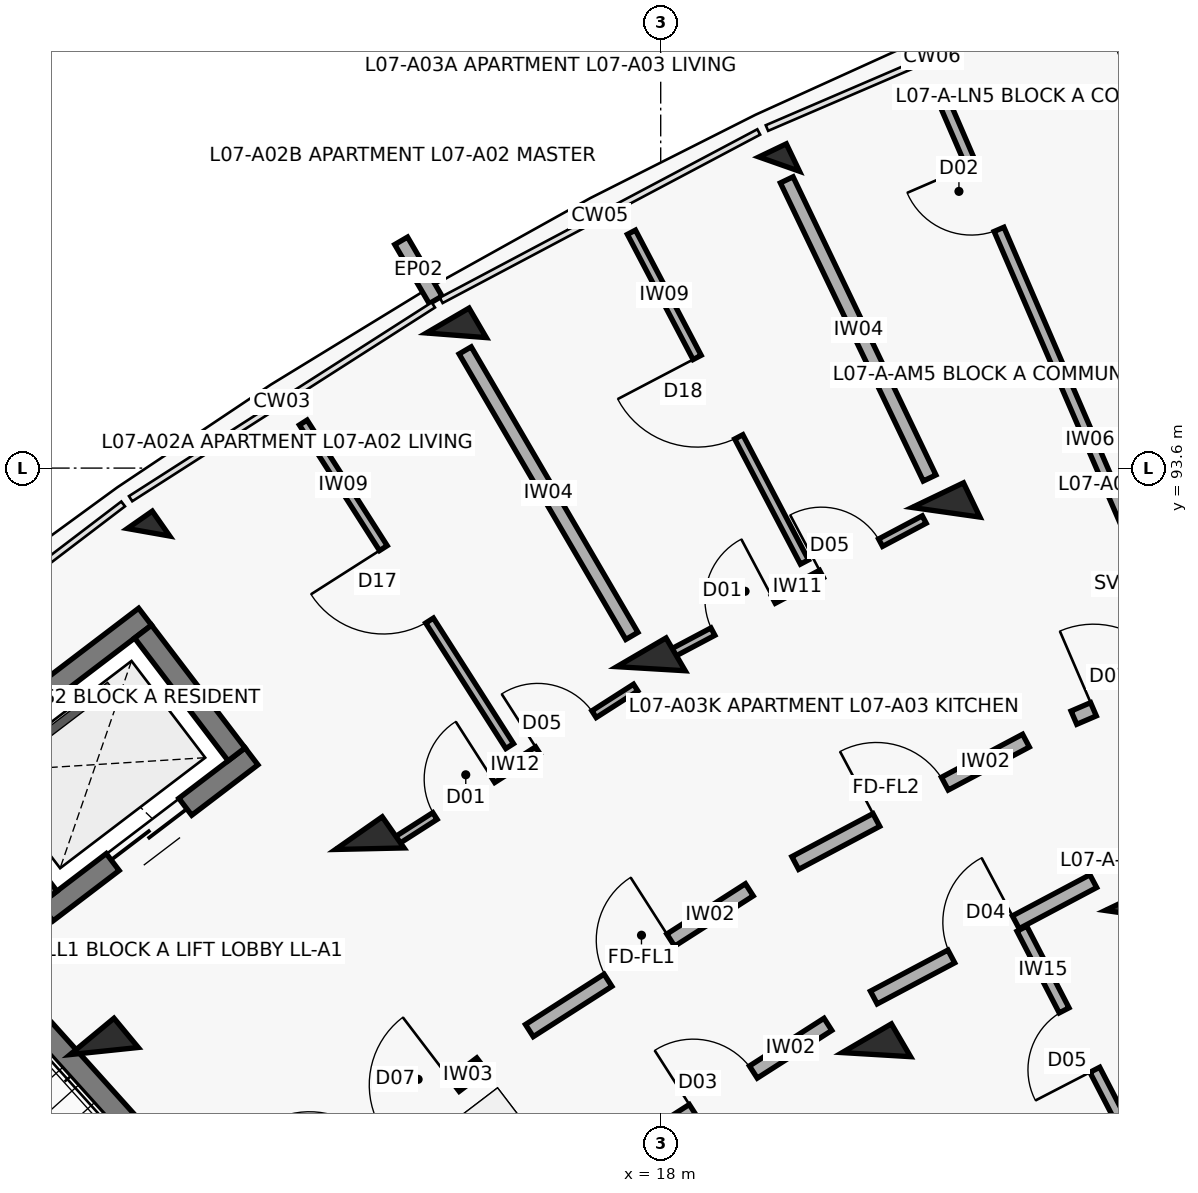
"""IFC4 building model, lengths in metres.
Left out: names, types, materials, properties, quantities, classifications, styles, units other than length and angle.
Written with IfcOpenShell. Run it as: python <this file> out.ifc"""

import sys

from ifc_helpers import new_model, si_unit, direction, frame, frame_2d, origin, origin_2d, place, context, subcontext, project, spatial, rectangle, extrude, element, fill, save


model = new_model("IFC4")
c1 = context("Model", 3, precision=1e-05, world=origin(), true_north=direction((0.0, 1.0)))
c2 = subcontext(c1, "Body", "Model", "MODEL_VIEW")
j1 = project(units=[si_unit("LENGTHUNIT", "METRE"), si_unit("PLANEANGLEUNIT", "RADIAN")], contexts=[c1])
p1 = place(None, origin())
s1 = spatial("IfcSite", under=j1, at=p1, CompositionType="ELEMENT")
p2 = place(p1, origin())
s2 = spatial("IfcBuilding", under=s1, at=p2, CompositionType="ELEMENT")
p3 = place(p2, frame((0.0, 0.0, 23.6)))
s3 = spatial("IfcBuildingStorey", under=s2, at=p3, CompositionType="ELEMENT", Elevation=23.6)
for number, where, z_axis, x_axis in (
    (1, (10.678, 85.93, 0.0), (0.0, 0.0, 1.0), (-0.638, 0.77, 0.0)),
    (2, (14.172, 88.592, 0.0), (0.0, 0.0, 1.0), (-0.573, 0.82, 0.0)),
):
    element("IfcColumn", number, at=place(p3, frame(where, z_axis=z_axis, x_axis=x_axis)), inside=s3, PredefinedType="COLUMN", context=c2, shape_type="SweptSolid", body=[
        extrude(rectangle(XDim=0.5, YDim=0.75, at=origin_2d()), origin(), (0.0, 0.0, 1.0), 3.1),
    ])
p4 = place(p3, frame((11.261, 92.755, 0.0), z_axis=(0.0, 0.0, 1.0), x_axis=(-0.573004420611, 0.819552276527, 0.0)))
e3 = element("IfcColumn", 3, at=p4, inside=s3, PredefinedType="COLUMN", context=c2, shape_type="SweptSolid", body=[
    extrude(rectangle(XDim=0.4, YDim=0.4, at=origin_2d()), origin(), (0.0, 0.0, 1.0), 3.1),
])
for number, where, z_axis, x_axis in (
    (4, (20.837, 85.882, 0.0), (0.0, 0.0, 1.0), (-0.504, 0.864, 0.0)),
    (5, (17.873, 90.96, 0.0), (0.0, 0.0, 1.0), (-0.504, 0.864, 0.0)),
):
    element("IfcColumn", number, at=place(p3, frame(where, z_axis=z_axis, x_axis=x_axis)), inside=s3, PredefinedType="COLUMN", context=c2, shape_type="SweptSolid", body=[
        extrude(rectangle(XDim=0.5, YDim=0.75, at=origin_2d()), origin(), (0.0, 0.0, 1.0), 3.1),
    ])
p5 = place(p3, frame((15.311, 95.347, 0.0), z_axis=(0.0, 0.0, 1.0), x_axis=(-0.504226211181, 0.863571611366, 0.0)))
e6 = element("IfcColumn", 6, at=p5, inside=s3, PredefinedType="COLUMN", context=c2, shape_type="SweptSolid", body=[
    extrude(rectangle(XDim=0.45, YDim=0.65, at=origin_2d()), origin(), (0.0, 0.0, 1.0), 3.1),
])
for number, where, z_axis, x_axis in (
    (7, (24.294, 87.716, 0.0), (0.0, 0.0, 1.0), (-0.432, 0.902, 0.0)),
    (8, (21.754, 93.019, 0.0), (0.0, 0.0, 1.0), (-0.432, 0.902, 0.0)),
):
    element("IfcColumn", number, at=place(p3, frame(where, z_axis=z_axis, x_axis=x_axis)), inside=s3, PredefinedType="COLUMN", context=c2, shape_type="SweptSolid", body=[
        extrude(rectangle(XDim=0.5, YDim=0.75, at=origin_2d()), origin(), (0.0, 0.0, 1.0), 3.1),
    ])
p6 = place(p3, frame((19.559, 97.6, 0.0), z_axis=(0.0, 0.0, 1.0), x_axis=(-0.432085748802, 0.901832526405, 0.0)))
e9 = element("IfcColumn", 9, at=p6, inside=s3, PredefinedType="COLUMN", context=c2, shape_type="SweptSolid", body=[
    extrude(rectangle(XDim=0.4, YDim=0.4, at=origin_2d()), origin(), (0.0, 0.0, 1.0), 3.1),
])
p7 = place(p3, frame((15.039, 95.813, 0.0), z_axis=(0.0, 0.0, 1.0), x_axis=(-0.504326383773, 0.863513114336, 0.0)))
e10 = element("IfcWall", 10, at=p7, inside=s3, PredefinedType="PARAPET", context=c2, shape_type="SweptSolid", body=[
    extrude(rectangle(XDim=0.9, YDim=0.195, at=frame_2d((0.45, 0.0))), origin(), (0.0, 0.0, 1.0), 2.25),
])
p8 = place(p3, frame((12.345, 83.461, 0.0), z_axis=(0.0, 0.0, 1.0), x_axis=(-0.668868253964, 0.743380964808, 0.0)))
e11 = element("IfcWall", 11, at=p8, inside=s3, PredefinedType="SHEAR", context=c2, shape_type="SweptSolid", body=[
    extrude(rectangle(XDim=7.69, YDim=0.3, at=frame_2d((3.845, 0.0))), origin(), (0.0, 0.0, 1.0), 3.1),
])
p9 = place(p3, frame((12.616, 89.807, 0.0), z_axis=(0.0, 0.0, 1.0), x_axis=(-0.795474703455, -0.605986795371, 0.0)))
e12 = element("IfcWall", 12, at=p9, inside=s3, PredefinedType="SHEAR", context=c2, shape_type="SweptSolid", body=[
    extrude(rectangle(XDim=3.39, YDim=0.28, at=frame_2d((1.695, 0.0))), origin(), (0.0, 0.0, 1.0), 3.1),
])
p10 = place(p9, frame((1.095, 0.0, 0.0)))
e13 = element("IfcOpeningElement", 13, at=p10, cuts=e12, PredefinedType="OPENING", context=c2, shape_type="SweptSolid", body=[
    extrude(rectangle(XDim=1.2, YDim=2.15, at=frame_2d((0.6, 1.075))), frame((0.0, 0.15, 0.0), z_axis=(0.0, -1.0, 0.0), x_axis=(1.0, 0.0, 0.0)), (0.0, 0.0, 1.0), 0.3),
])
p11 = place(p3, frame((11.216, 91.645, 0.0), z_axis=(0.0, 0.0, 1.0), x_axis=(-0.795439986025, -0.606032365994, 0.0)))
e14 = element("IfcWall", 14, at=p11, inside=s3, PredefinedType="SHEAR", context=c2, shape_type="SweptSolid", body=[
    extrude(rectangle(XDim=3.39, YDim=0.28, at=frame_2d((1.695, 0.0))), origin(), (0.0, 0.0, 1.0), 3.1),
])
p12 = place(p3, frame((12.42, 89.834, 0.0), z_axis=(0.0, 0.0, 1.0), x_axis=(-0.605948992168, 0.795503500238, 0.0)))
e15 = element("IfcWall", 15, at=p12, inside=s3, PredefinedType="SHEAR", context=c2, shape_type="SweptSolid", body=[
    extrude(rectangle(XDim=2.03, YDim=0.28, at=frame_2d((1.015, 0.0))), origin(), (0.0, 0.0, 1.0), 3.1),
])
p13 = place(p3, frame((9.946, 87.949, 0.0), z_axis=(0.0, 0.0, 1.0), x_axis=(-0.605891019062, 0.795547656033, 0.0)))
e16 = element("IfcWall", 16, at=p13, inside=s3, PredefinedType="SHEAR", context=c2, shape_type="SweptSolid", body=[
    extrude(rectangle(XDim=2.03, YDim=0.28, at=frame_2d((1.015, 0.0))), origin(), (0.0, 0.0, 1.0), 3.1),
])
p14 = place(p3, frame((13.021, 83.759, 0.0), z_axis=(0.0, 0.0, 1.0), x_axis=(0.795498026433, 0.605956178235, 0.0)))
e17 = element("IfcWall", 17, at=p14, inside=s3, PredefinedType="SOLIDWALL", context=c2, shape_type="SweptSolid", body=[
    extrude(rectangle(XDim=3.296, YDim=0.21, at=frame_2d((1.648, 0.0))), origin(), (0.0, 0.0, 1.0), 2.08),
])
p15 = place(p14, frame((0.45, 0.0, 0.0)))
e18 = element("IfcOpeningElement", 18, at=p15, cuts=e17, PredefinedType="OPENING", context=c2, shape_type="SweptSolid", body=[
    extrude(rectangle(XDim=1.1, YDim=2.15, at=frame_2d((0.55, 1.075))), frame((0.0, 0.115, 0.0), z_axis=(0.0, -1.0, 0.0), x_axis=(1.0, 0.0, 0.0)), (0.0, 0.0, 1.0), 0.23),
])
p16 = place(p14, frame((1.726, 0.0, 0.0)))
e19 = element("IfcOpeningElement", 19, at=p16, cuts=e17, PredefinedType="OPENING", context=c2, shape_type="SweptSolid", body=[
    extrude(rectangle(XDim=1.12, YDim=2.15, at=frame_2d((0.56, 1.075))), frame((0.0, 0.115, 0.0), z_axis=(0.0, -1.0, 0.0), x_axis=(1.0, 0.0, 0.0)), (0.0, 0.0, 1.0), 0.23),
])
p17 = place(p3, frame((16.272, 86.199, 0.0), z_axis=(0.0, 0.0, 1.0), x_axis=(0.842257205985, 0.539075874963, 0.0)))
e20 = element("IfcWall", 20, at=p17, inside=s3, PredefinedType="SOLIDWALL", context=c2, shape_type="SweptSolid", body=[
    extrude(rectangle(XDim=3.436, YDim=0.19, at=frame_2d((1.718, 0.0))), origin(), (0.0, 0.0, 1.0), 2.08),
])
p18 = place(p17, frame((1.228, 0.0, 0.0)))
e21 = element("IfcOpeningElement", 21, at=p18, cuts=e20, PredefinedType="OPENING", context=c2, shape_type="SweptSolid", body=[
    extrude(rectangle(XDim=0.98, YDim=2.15, at=frame_2d((0.49, 1.075))), frame((0.0, 0.105, 0.0), z_axis=(0.0, -1.0, 0.0), x_axis=(1.0, 0.0, 0.0)), (0.0, 0.0, 1.0), 0.21),
])
p19 = place(p3, frame((17.447, 84.519, 0.0), z_axis=(0.0, 0.0, 1.0), x_axis=(0.842225276846, 0.539125758095, 0.0)))
e22 = element("IfcWall", 22, at=p19, inside=s3, PredefinedType="SOLIDWALL", context=c2, shape_type="SweptSolid", body=[
    extrude(rectangle(XDim=3.269, YDim=0.19, at=frame_2d((1.634, 0.0))), origin(), (0.0, 0.0, 1.0), 2.08),
])
p20 = place(p19, frame((1.164, 0.0, 0.0)))
e23 = element("IfcOpeningElement", 23, at=p20, cuts=e22, PredefinedType="OPENING", context=c2, shape_type="SweptSolid", body=[
    extrude(rectangle(XDim=0.94, YDim=2.1, at=frame_2d((0.47, 1.05))), frame((0.0, 0.105, 0.0), z_axis=(0.0, -1.0, 0.0), x_axis=(1.0, 0.0, 0.0)), (0.0, 0.0, 1.0), 0.21),
])
p21 = place(p3, frame((14.482, 88.672, 0.0), z_axis=(0.0, 0.0, 1.0), x_axis=(0.842245628842, 0.539093962771, 0.0)))
e24 = element("IfcWall", 24, at=p21, inside=s3, PredefinedType="PARTITIONING", context=c2, shape_type="SweptSolid", body=[
    extrude(rectangle(XDim=3.785, YDim=0.105, at=frame_2d((1.893, 0.0))), origin(), (0.0, 0.0, 1.0), 2.08),
])
p22 = place(p21, frame((0.65, 0.0, 0.0)))
e25 = element("IfcOpeningElement", 25, at=p22, cuts=e24, PredefinedType="OPENING", context=c2, shape_type="SweptSolid", body=[
    extrude(rectangle(XDim=0.9, YDim=2.1, at=frame_2d((0.45, 1.05))), frame((0.0, 0.062, 0.0), z_axis=(0.0, -1.0, 0.0), x_axis=(1.0, 0.0, 0.0)), (0.0, 0.0, 1.0), 0.125),
])
p23 = place(p21, frame((2.255, 0.0, 0.0)))
e26 = element("IfcOpeningElement", 26, at=p23, cuts=e24, PredefinedType="OPENING", context=c2, shape_type="SweptSolid", body=[
    extrude(rectangle(XDim=0.88, YDim=2.1, at=frame_2d((0.44, 1.05))), frame((0.0, 0.062, 0.0), z_axis=(0.0, -1.0, 0.0), x_axis=(1.0, 0.0, 0.0)), (0.0, 0.0, 1.0), 0.125),
])
p24 = place(p3, frame((16.013, 89.942, 0.0), z_axis=(0.0, 0.0, 1.0), x_axis=(-0.537785480308, 0.843081714409, 0.0)))
e27 = element("IfcWall", 27, at=p24, inside=s3, PredefinedType="PARTITIONING", context=c2, shape_type="SweptSolid", body=[
    extrude(rectangle(XDim=5.05, YDim=0.12, at=frame_2d((2.525, 0.0))), origin(), (0.0, 0.0, 1.0), 2.08),
])
p25 = place(p24, frame((1.96, 0.0, 0.0)))
e28 = element("IfcOpeningElement", 28, at=p25, cuts=e27, PredefinedType="OPENING", context=c2, shape_type="SweptSolid", body=[
    extrude(rectangle(XDim=1.13, YDim=2.1, at=frame_2d((0.565, 1.05))), frame((0.0, 0.07, 0.0), z_axis=(0.0, -1.0, 0.0), x_axis=(1.0, 0.0, 0.0)), (0.0, 0.0, 1.0), 0.14),
])
p26 = place(p3, frame((19.77, 88.404, 0.0), z_axis=(0.0, 0.0, 1.0), x_axis=(0.883410853063, 0.468599258099, 0.0)))
e29 = element("IfcWall", 29, at=p26, inside=s3, PredefinedType="SOLIDWALL", context=c2, shape_type="SweptSolid", body=[
    extrude(rectangle(XDim=3.436, YDim=0.19, at=frame_2d((1.718, 0.0))), origin(), (0.0, 0.0, 1.0), 2.08),
])
p27 = place(p26, frame((1.208, 0.0, 0.0)))
e30 = element("IfcOpeningElement", 30, at=p27, cuts=e29, PredefinedType="OPENING", context=c2, shape_type="SweptSolid", body=[
    extrude(rectangle(XDim=1.02, YDim=2.15, at=frame_2d((0.51, 1.075))), frame((0.0, 0.105, 0.0), z_axis=(0.0, -1.0, 0.0), x_axis=(1.0, 0.0, 0.0)), (0.0, 0.0, 1.0), 0.21),
])
p28 = place(p3, frame((20.804, 86.634, 0.0), z_axis=(0.0, 0.0, 1.0), x_axis=(0.883444301944, 0.468536194293, 0.0)))
e31 = element("IfcWall", 31, at=p28, inside=s3, PredefinedType="SOLIDWALL", context=c2, shape_type="SweptSolid", body=[
    extrude(rectangle(XDim=3.269, YDim=0.19, at=frame_2d((1.634, 0.0))), origin(), (0.0, 0.0, 1.0), 2.08),
])
p29 = place(p28, frame((1.154, 0.0, 0.0)))
e32 = element("IfcOpeningElement", 32, at=p29, cuts=e31, PredefinedType="OPENING", context=c2, shape_type="SweptSolid", body=[
    extrude(rectangle(XDim=0.96, YDim=2.1, at=frame_2d((0.48, 1.05))), frame((0.0, 0.105, 0.0), z_axis=(0.0, -1.0, 0.0), x_axis=(1.0, 0.0, 0.0)), (0.0, 0.0, 1.0), 0.21),
])
p30 = place(p3, frame((24.267, 84.608, 0.0), z_axis=(0.0, 0.0, 1.0), x_axis=(-0.459217611894, 0.888323806349, 0.0)))
e33 = element("IfcWall", 33, at=p30, inside=s3, PredefinedType="PARTITIONING", context=c2, shape_type="SweptSolid", body=[
    extrude(rectangle(XDim=3.3, YDim=0.145, at=frame_2d((1.65, 0.0))), origin(), (0.0, 0.0, 1.0), 2.08),
])
p31 = place(p30, frame((1.21, 0.0, 0.0)))
e34 = element("IfcOpeningElement", 34, at=p31, cuts=e33, PredefinedType="OPENING", context=c2, shape_type="SweptSolid", body=[
    extrude(rectangle(XDim=0.88, YDim=2.1, at=frame_2d((0.44, 1.05))), frame((0.0, 0.083, 0.0), z_axis=(0.0, -1.0, 0.0), x_axis=(1.0, 0.0, 0.0)), (0.0, 0.0, 1.0), 0.165),
])
p32 = place(p3, frame((18.113, 91.144, 0.0), z_axis=(0.0, 0.0, 1.0), x_axis=(0.88341855112, 0.46858474531, 0.0)))
e35 = element("IfcWall", 35, at=p32, inside=s3, PredefinedType="PARTITIONING", context=c2, shape_type="SweptSolid", body=[
    extrude(rectangle(XDim=3.797, YDim=0.11, at=frame_2d((1.898, 0.0))), origin(), (0.0, 0.0, 1.0), 2.08),
])
p33 = place(p32, frame((0.65, 0.0, 0.0)))
e36 = element("IfcOpeningElement", 36, at=p33, cuts=e35, PredefinedType="OPENING", context=c2, shape_type="SweptSolid", body=[
    extrude(rectangle(XDim=0.9, YDim=2.1, at=frame_2d((0.45, 1.05))), frame((0.0, 0.065, 0.0), z_axis=(0.0, -1.0, 0.0), x_axis=(1.0, 0.0, 0.0)), (0.0, 0.0, 1.0), 0.13),
])
p34 = place(p32, frame((2.267, 0.0, 0.0)))
e37 = element("IfcOpeningElement", 37, at=p34, cuts=e35, PredefinedType="OPENING", context=c2, shape_type="SweptSolid", body=[
    extrude(rectangle(XDim=0.88, YDim=2.1, at=frame_2d((0.44, 1.05))), frame((0.0, 0.065, 0.0), z_axis=(0.0, -1.0, 0.0), x_axis=(1.0, 0.0, 0.0)), (0.0, 0.0, 1.0), 0.13),
])
p35 = place(p3, frame((19.891, 92.364, 0.0), z_axis=(0.0, 0.0, 1.0), x_axis=(-0.464567298878, 0.885537816704, 0.0)))
e38 = element("IfcWall", 38, at=p35, inside=s3, PredefinedType="PARTITIONING", context=c2, shape_type="SweptSolid", body=[
    extrude(rectangle(XDim=4.9, YDim=0.12, at=frame_2d((2.45, 0.0))), origin(), (0.0, 0.0, 1.0), 2.08),
])
p36 = place(p35, frame((1.86, 0.0, 0.0)))
e39 = element("IfcOpeningElement", 39, at=p36, cuts=e38, PredefinedType="OPENING", context=c2, shape_type="SweptSolid", body=[
    extrude(rectangle(XDim=1.18, YDim=2.1, at=frame_2d((0.59, 1.05))), frame((0.0, 0.07, 0.0), z_axis=(0.0, -1.0, 0.0), x_axis=(1.0, 0.0, 0.0)), (0.0, 0.0, 1.0), 0.14),
])
p37 = place(p3, frame((17.621, 91.392, 0.0), z_axis=(0.0, 0.0, 1.0), x_axis=(-0.504216452091, 0.863577309475, 0.0)))
e40 = element("IfcWall", 40, at=p37, inside=s3, PredefinedType="SOLIDWALL", context=c2, shape_type="SweptSolid", body=[
    extrude(rectangle(XDim=4.35, YDim=0.185, at=frame_2d((2.175, 0.0))), origin(), (0.0, 0.0, 1.0), 2.08),
])
p38 = place(p3, frame((23.437, 90.316, 0.0), z_axis=(0.0, 0.0, 1.0), x_axis=(0.918718172399, 0.394913813008, 0.0)))
e41 = element("IfcWall", 41, at=p38, inside=s3, PredefinedType="SOLIDWALL", context=c2, shape_type="SweptSolid", body=[
    extrude(rectangle(XDim=3.436, YDim=0.19, at=frame_2d((1.718, 0.0))), origin(), (0.0, 0.0, 1.0), 2.08),
])
p39 = place(p38, frame((0.28, 0.0, 0.0)))
e42 = element("IfcOpeningElement", 42, at=p39, cuts=e41, PredefinedType="OPENING", context=c2, shape_type="SweptSolid", body=[
    extrude(rectangle(XDim=1.12, YDim=2.15, at=frame_2d((0.56, 1.075))), frame((0.0, 0.105, 0.0), z_axis=(0.0, -1.0, 0.0), x_axis=(1.0, 0.0, 0.0)), (0.0, 0.0, 1.0), 0.21),
])
p40 = place(p38, frame((2.266, 0.0, 0.0)))
e43 = element("IfcOpeningElement", 43, at=p40, cuts=e41, PredefinedType="OPENING", context=c2, shape_type="SweptSolid", body=[
    extrude(rectangle(XDim=0.95, YDim=2.1, at=frame_2d((0.475, 1.05))), frame((0.0, 0.105, 0.0), z_axis=(0.0, -1.0, 0.0), x_axis=(1.0, 0.0, 0.0)), (0.0, 0.0, 1.0), 0.21),
])
p41 = place(p3, frame((24.849, 91.187, 0.0), z_axis=(0.0, 0.0, 1.0), x_axis=(-0.396278945437, 0.91813016365, 0.0)))
e44 = element("IfcWall", 44, at=p41, inside=s3, PredefinedType="PARTITIONING", context=c2, shape_type="SweptSolid", body=[
    extrude(rectangle(XDim=7.95, YDim=0.14, at=frame_2d((3.975, 0.0))), origin(), (0.0, 0.0, 1.0), 2.08),
])
p42 = place(p41, frame((6.05, 0.0, 0.0)))
e45 = element("IfcOpeningElement", 45, at=p42, cuts=e44, PredefinedType="OPENING", context=c2, shape_type="SweptSolid", body=[
    extrude(rectangle(XDim=0.92, YDim=2.1, at=frame_2d((0.46, 1.05))), frame((0.0, 0.08, 0.0), z_axis=(0.0, -1.0, 0.0), x_axis=(1.0, 0.0, 0.0)), (0.0, 0.0, 1.0), 0.16),
])
for number, where, z_axis, x_axis in (
    (46, (21.538, 93.469, 0.0), (0.0, 0.0, 1.0), (-0.432, 0.902, 0.0)),
    (47, (25.611, 95.22, 0.0), (0.0, 0.0, 1.0), (-0.357, 0.934, 0.0)),
):
    element("IfcWall", number, at=place(p3, frame(where, z_axis=z_axis, x_axis=x_axis)), inside=s3, PredefinedType="SOLIDWALL", context=c2, shape_type="SweptSolid", body=[
        extrude(rectangle(XDim=4.35, YDim=0.185, at=frame_2d((2.175, 0.0))), origin(), (0.0, 0.0, 1.0), 2.08),
    ])
p43 = place(p10, origin())
e48 = element("IfcDoor", 48, at=p43, inside=s3, OperationType="DOUBLE_DOOR_SLIDING", PredefinedType="DOOR", context=c2, shape_type="SweptSolid", body=[
    extrude(rectangle(XDim=1.2, YDim=2.15, at=frame_2d((0.6, 1.075))), frame((0.0, 0.025, 0.0), z_axis=(0.0, -1.0, 0.0), x_axis=(1.0, 0.0, 0.0)), (0.0, 0.0, 1.0), 0.05),
])
fill(e13, e48)
p44 = place(p16, origin())
e49 = element("IfcDoor", 49, at=p44, inside=s3, OperationType="SINGLE_SWING_RIGHT", PredefinedType="DOOR", context=c2, shape_type="SweptSolid", body=[
    extrude(rectangle(XDim=1.12, YDim=2.15, at=frame_2d((0.56, 1.075))), frame((0.0, 0.025, 0.0), z_axis=(0.0, -1.0, 0.0), x_axis=(1.0, 0.0, 0.0)), (0.0, 0.0, 1.0), 0.05),
])
fill(e19, e49)
p45 = place(p18, origin())
e50 = element("IfcDoor", 50, at=p45, inside=s3, OperationType="SINGLE_SWING_RIGHT", PredefinedType="DOOR", context=c2, shape_type="SweptSolid", body=[
    extrude(rectangle(XDim=0.98, YDim=2.15, at=frame_2d((0.49, 1.075))), frame((0.0, 0.025, 0.0), z_axis=(0.0, -1.0, 0.0), x_axis=(1.0, 0.0, 0.0)), (0.0, 0.0, 1.0), 0.05),
])
fill(e21, e50)
p46 = place(p20, origin())
e51 = element("IfcDoor", 51, at=p46, inside=s3, OperationType="SINGLE_SWING_LEFT", PredefinedType="DOOR", context=c2, shape_type="SweptSolid", body=[
    extrude(rectangle(XDim=0.94, YDim=2.1, at=frame_2d((0.47, 1.05))), frame((0.0, 0.025, 0.0), z_axis=(0.0, -1.0, 0.0), x_axis=(1.0, 0.0, 0.0)), (0.0, 0.0, 1.0), 0.05),
])
fill(e23, e51)
p47 = place(p22, origin())
e52 = element("IfcDoor", 52, at=p47, inside=s3, OperationType="SINGLE_SWING_RIGHT", PredefinedType="DOOR", context=c2, shape_type="SweptSolid", body=[
    extrude(rectangle(XDim=0.9, YDim=2.1, at=frame_2d((0.45, 1.05))), frame((0.0, 0.025, 0.0), z_axis=(0.0, -1.0, 0.0), x_axis=(1.0, 0.0, 0.0)), (0.0, 0.0, 1.0), 0.05),
])
fill(e25, e52)
p48 = place(p23, origin())
e53 = element("IfcDoor", 53, at=p48, inside=s3, OperationType="SINGLE_SWING_LEFT", PredefinedType="DOOR", context=c2, shape_type="SweptSolid", body=[
    extrude(rectangle(XDim=0.88, YDim=2.1, at=frame_2d((0.44, 1.05))), frame((0.0, 0.025, 0.0), z_axis=(0.0, -1.0, 0.0), x_axis=(1.0, 0.0, 0.0)), (0.0, 0.0, 1.0), 0.05),
])
fill(e26, e53)
p49 = place(p25, origin())
e54 = element("IfcDoor", 54, at=p49, inside=s3, OperationType="SINGLE_SWING_RIGHT", PredefinedType="DOOR", context=c2, shape_type="SweptSolid", body=[
    extrude(rectangle(XDim=1.13, YDim=2.1, at=frame_2d((0.565, 1.05))), frame((0.0, 0.025, 0.0), z_axis=(0.0, -1.0, 0.0), x_axis=(1.0, 0.0, 0.0)), (0.0, 0.0, 1.0), 0.05),
])
fill(e28, e54)
p50 = place(p27, origin())
e55 = element("IfcDoor", 55, at=p50, inside=s3, OperationType="SINGLE_SWING_LEFT", PredefinedType="DOOR", context=c2, shape_type="SweptSolid", body=[
    extrude(rectangle(XDim=1.02, YDim=2.15, at=frame_2d((0.51, 1.075))), frame((0.0, 0.025, 0.0), z_axis=(0.0, -1.0, 0.0), x_axis=(1.0, 0.0, 0.0)), (0.0, 0.0, 1.0), 0.05),
])
fill(e30, e55)
p51 = place(p29, origin())
e56 = element("IfcDoor", 56, at=p51, inside=s3, OperationType="SINGLE_SWING_RIGHT", PredefinedType="DOOR", context=c2, shape_type="SweptSolid", body=[
    extrude(rectangle(XDim=0.96, YDim=2.1, at=frame_2d((0.48, 1.05))), frame((0.0, 0.025, 0.0), z_axis=(0.0, -1.0, 0.0), x_axis=(1.0, 0.0, 0.0)), (0.0, 0.0, 1.0), 0.05),
])
fill(e32, e56)
p52 = place(p31, origin())
e57 = element("IfcDoor", 57, at=p52, inside=s3, OperationType="SINGLE_SWING_LEFT", PredefinedType="DOOR", context=c2, shape_type="SweptSolid", body=[
    extrude(rectangle(XDim=0.88, YDim=2.1, at=frame_2d((0.44, 1.05))), frame((0.0, 0.025, 0.0), z_axis=(0.0, -1.0, 0.0), x_axis=(1.0, 0.0, 0.0)), (0.0, 0.0, 1.0), 0.05),
])
fill(e34, e57)
p53 = place(p33, origin())
e58 = element("IfcDoor", 58, at=p53, inside=s3, OperationType="SINGLE_SWING_RIGHT", PredefinedType="DOOR", context=c2, shape_type="SweptSolid", body=[
    extrude(rectangle(XDim=0.9, YDim=2.1, at=frame_2d((0.45, 1.05))), frame((0.0, 0.025, 0.0), z_axis=(0.0, -1.0, 0.0), x_axis=(1.0, 0.0, 0.0)), (0.0, 0.0, 1.0), 0.05),
])
fill(e36, e58)
p54 = place(p34, origin())
e59 = element("IfcDoor", 59, at=p54, inside=s3, OperationType="SINGLE_SWING_LEFT", PredefinedType="DOOR", context=c2, shape_type="SweptSolid", body=[
    extrude(rectangle(XDim=0.88, YDim=2.1, at=frame_2d((0.44, 1.05))), frame((0.0, 0.025, 0.0), z_axis=(0.0, -1.0, 0.0), x_axis=(1.0, 0.0, 0.0)), (0.0, 0.0, 1.0), 0.05),
])
fill(e37, e59)
p55 = place(p36, origin())
e60 = element("IfcDoor", 60, at=p55, inside=s3, OperationType="SINGLE_SWING_RIGHT", PredefinedType="DOOR", context=c2, shape_type="SweptSolid", body=[
    extrude(rectangle(XDim=1.18, YDim=2.1, at=frame_2d((0.59, 1.05))), frame((0.0, 0.025, 0.0), z_axis=(0.0, -1.0, 0.0), x_axis=(1.0, 0.0, 0.0)), (0.0, 0.0, 1.0), 0.05),
])
fill(e39, e60)
p56 = place(p39, origin())
e61 = element("IfcDoor", 61, at=p56, inside=s3, OperationType="SINGLE_SWING_LEFT", PredefinedType="DOOR", context=c2, shape_type="SweptSolid", body=[
    extrude(rectangle(XDim=1.12, YDim=2.15, at=frame_2d((0.56, 1.075))), frame((0.0, 0.025, 0.0), z_axis=(0.0, -1.0, 0.0), x_axis=(1.0, 0.0, 0.0)), (0.0, 0.0, 1.0), 0.05),
])
fill(e42, e61)
p57 = place(p42, origin())
e62 = element("IfcDoor", 62, at=p57, inside=s3, OperationType="SINGLE_SWING_RIGHT", PredefinedType="DOOR", context=c2, shape_type="SweptSolid", body=[
    extrude(rectangle(XDim=0.92, YDim=2.1, at=frame_2d((0.46, 1.05))), frame((0.0, 0.025, 0.0), z_axis=(0.0, -1.0, 0.0), x_axis=(1.0, 0.0, 0.0)), (0.0, 0.0, 1.0), 0.05),
])
fill(e45, e62)
save(model, sys.argv[1])
